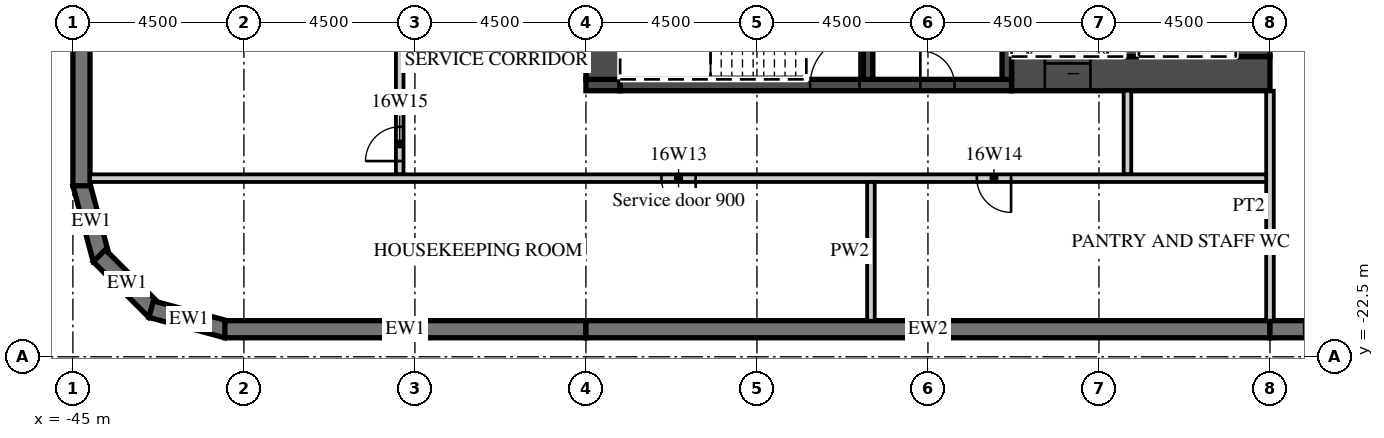
"""IFC4 building model, lengths in metres.
Left out: names, types, materials, properties, quantities, classifications, styles, units other than length and angle.
Written with IfcOpenShell. Run it as: python <this file> out.ifc"""

import sys

from ifc_helpers import new_model, si_unit, direction, frame, frame_2d, origin, place, context, subcontext, project, spatial, polyline, rectangle, outline, extrude, element, fill, save


model = new_model("IFC4")
c1 = context("Model", 3, precision=1e-05, world=origin(), true_north=direction((0.0, 1.0)))
c2 = subcontext(c1, "Body", "Model", "MODEL_VIEW")
j1 = project(units=[si_unit("LENGTHUNIT", "METRE"), si_unit("PLANEANGLEUNIT", "RADIAN")], contexts=[c1])
p1 = place(None, origin())
s1 = spatial("IfcSite", under=j1, at=p1, CompositionType="ELEMENT")
p2 = place(p1, origin())
s2 = spatial("IfcBuilding", under=s1, at=p2, CompositionType="ELEMENT")
p3 = place(p2, frame((0.0, 0.0, 83.1)))
s3 = spatial("IfcBuildingStorey", under=s2, at=p3, CompositionType="ELEMENT", Elevation=83.1)
p4 = place(p3, frame((-44.783, -17.942, 0.0), z_axis=(0.0, 0.0, 1.0), x_axis=(0.25881466832, -0.965926999034, 0.0)))
e1 = element("IfcWall", 1, at=p4, inside=s3, PredefinedType="SOLIDWALL", context=c2, shape_type="SweptSolid", body=[
    extrude(outline(polyline([(0.0, -0.225), (2.071, -0.225), (1.95, 0.225), (0.121, 0.225), (0.0, -0.225)])), origin(), (0.0, 0.0, 1.0), 3.02),
])
p5 = place(p3, frame((-44.305, -19.841, 0.0), z_axis=(0.0, 0.0, 1.0), x_axis=(0.707106781187, -0.707106781187, 0.0)))
e2 = element("IfcWall", 2, at=p5, inside=s3, PredefinedType="SOLIDWALL", context=c2, shape_type="SweptSolid", body=[
    extrude(outline(polyline([(0.0, -0.225), (2.071, -0.225), (1.95, 0.225), (0.121, 0.225), (0.0, -0.225)])), origin(), (0.0, 0.0, 1.0), 3.02),
])
p6 = place(p3, frame((-42.942, -21.247, 0.0), z_axis=(0.0, 0.0, 1.0), x_axis=(0.965926999034, -0.25881466832, 0.0)))
e3 = element("IfcWall", 3, at=p6, inside=s3, PredefinedType="SOLIDWALL", context=c2, shape_type="SweptSolid", body=[
    extrude(outline(polyline([(-0.0, -0.225), (2.07, -0.225), (1.95, 0.225), (0.12, 0.225), (-0.0, -0.225)])), origin(), (0.0, 0.0, 1.0), 3.02),
])
p7 = place(p3, frame((-41.0, -21.775, 0.0), z_axis=(0.0, 0.0, 1.0), x_axis=(1.0, 0.0, 0.0)))
e4 = element("IfcWall", 4, at=p7, inside=s3, PredefinedType="SOLIDWALL", context=c2, shape_type="SweptSolid", body=[
    extrude(rectangle(XDim=9.5, YDim=0.45, at=frame_2d((4.75, 0.0))), origin(), (0.0, 0.0, 1.0), 3.02),
])
p8 = place(p3, frame((-31.5, -21.775, 0.0), z_axis=(0.0, 0.0, 1.0), x_axis=(1.0, 0.0, 0.0)))
e5 = element("IfcWall", 5, at=p8, inside=s3, PredefinedType="SOLIDWALL", context=c2, shape_type="SweptSolid", body=[
    extrude(rectangle(XDim=18.0, YDim=0.45, at=frame_2d((9.0, 0.0))), origin(), (0.0, 0.0, 1.0), 3.02),
])
p9 = place(p3, frame((-13.5, -21.775, 0.0), z_axis=(0.0, 0.0, 1.0), x_axis=(1.0, 0.0, 0.0)))
e6 = element("IfcWall", 6, at=p9, inside=s3, PredefinedType="SOLIDWALL", context=c2, shape_type="SweptSolid", body=[
    extrude(rectangle(XDim=54.5, YDim=0.45, at=frame_2d((27.25, 0.0))), origin(), (0.0, 0.0, 1.0), 3.02),
])
p10 = place(p9, frame((0.9, 0.0, 0.45)))
e7 = element("IfcOpeningElement", 7, at=p10, cuts=e6, PredefinedType="OPENING", context=c2, shape_type="SweptSolid", body=[
    extrude(rectangle(XDim=2.7, YDim=2.25, at=frame_2d((1.35, 1.125))), frame((0.0, 0.235, 0.0), z_axis=(0.0, -1.0, 0.0), x_axis=(1.0, 0.0, 0.0)), (0.0, 0.0, 1.0), 0.47),
])
p11 = place(p9, frame((5.4, 0.0, 0.45)))
e8 = element("IfcOpeningElement", 8, at=p11, cuts=e6, PredefinedType="OPENING", context=c2, shape_type="SweptSolid", body=[
    extrude(rectangle(XDim=2.7, YDim=2.25, at=frame_2d((1.35, 1.125))), frame((0.0, 0.235, 0.0), z_axis=(0.0, -1.0, 0.0), x_axis=(1.0, 0.0, 0.0)), (0.0, 0.0, 1.0), 0.47),
])
p12 = place(p9, frame((9.9, 0.0, 0.45)))
e9 = element("IfcOpeningElement", 9, at=p12, cuts=e6, PredefinedType="OPENING", context=c2, shape_type="SweptSolid", body=[
    extrude(rectangle(XDim=2.7, YDim=2.25, at=frame_2d((1.35, 1.125))), frame((0.0, 0.235, 0.0), z_axis=(0.0, -1.0, 0.0), x_axis=(1.0, 0.0, 0.0)), (0.0, 0.0, 1.0), 0.47),
])
p13 = place(p9, frame((14.4, 0.0, 0.45)))
e10 = element("IfcOpeningElement", 10, at=p13, cuts=e6, PredefinedType="OPENING", context=c2, shape_type="SweptSolid", body=[
    extrude(rectangle(XDim=2.7, YDim=2.25, at=frame_2d((1.35, 1.125))), frame((0.0, 0.235, 0.0), z_axis=(0.0, -1.0, 0.0), x_axis=(1.0, 0.0, 0.0)), (0.0, 0.0, 1.0), 0.47),
])
p14 = place(p9, frame((18.9, 0.0, 0.45)))
e11 = element("IfcOpeningElement", 11, at=p14, cuts=e6, PredefinedType="OPENING", context=c2, shape_type="SweptSolid", body=[
    extrude(rectangle(XDim=2.7, YDim=2.25, at=frame_2d((1.35, 1.125))), frame((0.0, 0.235, 0.0), z_axis=(0.0, -1.0, 0.0), x_axis=(1.0, 0.0, 0.0)), (0.0, 0.0, 1.0), 0.47),
])
p15 = place(p9, frame((23.4, 0.0, 0.45)))
e12 = element("IfcOpeningElement", 12, at=p15, cuts=e6, PredefinedType="OPENING", context=c2, shape_type="SweptSolid", body=[
    extrude(rectangle(XDim=2.7, YDim=2.25, at=frame_2d((1.35, 1.125))), frame((0.0, 0.235, 0.0), z_axis=(0.0, -1.0, 0.0), x_axis=(1.0, 0.0, 0.0)), (0.0, 0.0, 1.0), 0.47),
])
p16 = place(p9, frame((27.9, 0.0, 0.45)))
e13 = element("IfcOpeningElement", 13, at=p16, cuts=e6, PredefinedType="OPENING", context=c2, shape_type="SweptSolid", body=[
    extrude(rectangle(XDim=2.7, YDim=2.25, at=frame_2d((1.35, 1.125))), frame((0.0, 0.235, 0.0), z_axis=(0.0, -1.0, 0.0), x_axis=(1.0, 0.0, 0.0)), (0.0, 0.0, 1.0), 0.47),
])
p17 = place(p9, frame((32.4, 0.0, 0.45)))
e14 = element("IfcOpeningElement", 14, at=p17, cuts=e6, PredefinedType="OPENING", context=c2, shape_type="SweptSolid", body=[
    extrude(rectangle(XDim=2.7, YDim=2.25, at=frame_2d((1.35, 1.125))), frame((0.0, 0.235, 0.0), z_axis=(0.0, -1.0, 0.0), x_axis=(1.0, 0.0, 0.0)), (0.0, 0.0, 1.0), 0.47),
])
p18 = place(p9, frame((36.9, 0.0, 0.45)))
e15 = element("IfcOpeningElement", 15, at=p18, cuts=e6, PredefinedType="OPENING", context=c2, shape_type="SweptSolid", body=[
    extrude(rectangle(XDim=2.7, YDim=2.25, at=frame_2d((1.35, 1.125))), frame((0.0, 0.235, 0.0), z_axis=(0.0, -1.0, 0.0), x_axis=(1.0, 0.0, 0.0)), (0.0, 0.0, 1.0), 0.47),
])
p19 = place(p9, frame((41.4, 0.0, 0.45)))
e16 = element("IfcOpeningElement", 16, at=p19, cuts=e6, PredefinedType="OPENING", context=c2, shape_type="SweptSolid", body=[
    extrude(rectangle(XDim=2.7, YDim=2.25, at=frame_2d((1.35, 1.125))), frame((0.0, 0.235, 0.0), z_axis=(0.0, -1.0, 0.0), x_axis=(1.0, 0.0, 0.0)), (0.0, 0.0, 1.0), 0.47),
])
p20 = place(p9, frame((45.9, 0.0, 0.45)))
e17 = element("IfcOpeningElement", 17, at=p20, cuts=e6, PredefinedType="OPENING", context=c2, shape_type="SweptSolid", body=[
    extrude(rectangle(XDim=2.7, YDim=2.25, at=frame_2d((1.35, 1.125))), frame((0.0, 0.235, 0.0), z_axis=(0.0, -1.0, 0.0), x_axis=(1.0, 0.0, 0.0)), (0.0, 0.0, 1.0), 0.47),
])
p21 = place(p9, frame((50.4, 0.0, 0.45)))
e18 = element("IfcOpeningElement", 18, at=p21, cuts=e6, PredefinedType="OPENING", context=c2, shape_type="SweptSolid", body=[
    extrude(rectangle(XDim=2.7, YDim=2.25, at=frame_2d((1.35, 1.125))), frame((0.0, 0.235, 0.0), z_axis=(0.0, -1.0, 0.0), x_axis=(1.0, 0.0, 0.0)), (0.0, 0.0, 1.0), 0.47),
])
p22 = place(p3, frame((-44.775, 18.0, 0.0), z_axis=(0.0, 0.0, 1.0), x_axis=(0.0, -1.0, 0.0)))
e19 = element("IfcWall", 19, at=p22, inside=s3, PredefinedType="SOLIDWALL", context=c2, shape_type="SweptSolid", body=[
    extrude(rectangle(XDim=36.0, YDim=0.45, at=frame_2d((18.0, 0.0))), origin(), (0.0, 0.0, 1.0), 3.02),
])
p23 = place(p22, frame((3.9, 0.0, 0.45)))
e20 = element("IfcOpeningElement", 20, at=p23, cuts=e19, PredefinedType="OPENING", context=c2, shape_type="SweptSolid", body=[
    extrude(rectangle(XDim=3.3, YDim=2.25, at=frame_2d((1.65, 1.125))), frame((0.0, 0.235, 0.0), z_axis=(0.0, -1.0, 0.0), x_axis=(1.0, 0.0, 0.0)), (0.0, 0.0, 1.0), 0.47),
])
p24 = place(p22, frame((8.4, 0.0, 0.45)))
e21 = element("IfcOpeningElement", 21, at=p24, cuts=e19, PredefinedType="OPENING", context=c2, shape_type="SweptSolid", body=[
    extrude(rectangle(XDim=3.3, YDim=2.25, at=frame_2d((1.65, 1.125))), frame((0.0, 0.235, 0.0), z_axis=(0.0, -1.0, 0.0), x_axis=(1.0, 0.0, 0.0)), (0.0, 0.0, 1.0), 0.47),
])
p25 = place(p22, frame((12.9, 0.0, 0.45)))
e22 = element("IfcOpeningElement", 22, at=p25, cuts=e19, PredefinedType="OPENING", context=c2, shape_type="SweptSolid", body=[
    extrude(rectangle(XDim=3.3, YDim=2.25, at=frame_2d((1.65, 1.125))), frame((0.0, 0.235, 0.0), z_axis=(0.0, -1.0, 0.0), x_axis=(1.0, 0.0, 0.0)), (0.0, 0.0, 1.0), 0.47),
])
p26 = place(p3, frame((-13.5, -21.55, 0.0), z_axis=(0.0, 0.0, 1.0), x_axis=(0.0, 1.0, 0.0)))
e23 = element("IfcWall", 23, at=p26, inside=s3, PredefinedType="PARTITIONING", context=c2, shape_type="SweptSolid", body=[
    extrude(rectangle(XDim=6.05, YDim=0.2, at=frame_2d((3.025, 0.0))), origin(), (0.0, 0.0, 1.0), 3.02),
])
p27 = place(p3, frame((-20.3, -15.05, 0.0), z_axis=(0.0, 0.0, 1.0), x_axis=(1.0, 0.0, 0.0)))
e24 = element("IfcWall", 24, at=p27, inside=s3, PredefinedType="SHEAR", context=c2, shape_type="SweptSolid", body=[
    extrude(rectangle(XDim=6.8, YDim=0.9, at=frame_2d((3.4, 0.0))), origin(), (0.0, 0.0, 1.0), 3.02),
])
p28 = place(p27, frame((0.875, 0.0, 0.0)))
e25 = element("IfcOpeningElement", 25, at=p28, cuts=e24, PredefinedType="OPENING", context=c2, shape_type="SweptSolid", body=[
    extrude(rectangle(XDim=1.2, YDim=2.1, at=frame_2d((0.6, 1.05))), frame((0.0, 0.46, 0.0), z_axis=(0.0, -1.0, 0.0), x_axis=(1.0, 0.0, 0.0)), (0.0, 0.0, 1.0), 0.92),
])
p29 = place(p3, frame((-31.5, -15.35, 0.0), z_axis=(0.0, 0.0, 1.0), x_axis=(1.0, 0.0, 0.0)))
e26 = element("IfcWall", 26, at=p29, inside=s3, PredefinedType="SHEAR", context=c2, shape_type="SweptSolid", body=[
    extrude(rectangle(XDim=0.9, YDim=0.3, at=frame_2d((0.45, 0.0))), origin(), (0.0, 0.0, 1.0), 3.02),
])
p30 = place(p3, frame((-30.6, -15.35, 0.0), z_axis=(0.0, 0.0, 1.0), x_axis=(1.0, 0.0, 0.0)))
e27 = element("IfcWall", 27, at=p30, inside=s3, PredefinedType="SHEAR", context=c2, shape_type="SweptSolid", body=[
    extrude(rectangle(XDim=10.3, YDim=0.3, at=frame_2d((5.15, 0.0))), origin(), (0.0, 0.0, 1.0), 3.02),
])
p31 = place(p30, frame((5.0, 0.0, 0.0)))
e28 = element("IfcOpeningElement", 28, at=p31, cuts=e27, PredefinedType="OPENING", context=c2, shape_type="SweptSolid", body=[
    extrude(rectangle(XDim=1.3, YDim=2.1, at=frame_2d((0.65, 1.05))), frame((0.0, 0.16, 0.0), z_axis=(0.0, -1.0, 0.0), x_axis=(1.0, 0.0, 0.0)), (0.0, 0.0, 1.0), 0.32),
])
p32 = place(p30, frame((7.9, 0.0, 0.0)))
e29 = element("IfcOpeningElement", 29, at=p32, cuts=e27, PredefinedType="OPENING", context=c2, shape_type="SweptSolid", body=[
    extrude(rectangle(XDim=0.9, YDim=2.1, at=frame_2d((0.45, 1.05))), frame((0.0, 0.16, 0.0), z_axis=(0.0, -1.0, 0.0), x_axis=(1.0, 0.0, 0.0)), (0.0, 0.0, 1.0), 0.32),
])
p33 = place(p3, frame((-31.05, -15.2, 0.0), z_axis=(0.0, 0.0, 1.0), x_axis=(0.0, 1.0, 0.0)))
e30 = element("IfcWall", 30, at=p33, inside=s3, PredefinedType="SHEAR", context=c2, shape_type="SweptSolid", body=[
    extrude(rectangle(XDim=12.8, YDim=0.9, at=frame_2d((6.4, 0.0))), origin(), (0.0, 0.0, 1.0), 3.02),
])
p34 = place(p33, frame((11.5, 0.0, 0.0)))
e31 = element("IfcOpeningElement", 31, at=p34, cuts=e30, PredefinedType="OPENING", context=c2, shape_type="SweptSolid", body=[
    extrude(rectangle(XDim=1.1, YDim=2.1, at=frame_2d((0.55, 1.05))), frame((0.0, 0.46, 0.0), z_axis=(0.0, -1.0, 0.0), x_axis=(1.0, 0.0, 0.0)), (0.0, 0.0, 1.0), 0.92),
])
p35 = place(p3, frame((-13.95, -14.6, 0.0), z_axis=(0.0, 0.0, 1.0), x_axis=(0.0, 1.0, 0.0)))
e32 = element("IfcWall", 32, at=p35, inside=s3, PredefinedType="SHEAR", context=c2, shape_type="SweptSolid", body=[
    extrude(rectangle(XDim=12.2, YDim=0.9, at=frame_2d((6.1, 0.0))), origin(), (0.0, 0.0, 1.0), 3.02),
])
p36 = place(p3, frame((-17.15, -14.6, 0.0), z_axis=(0.0, 0.0, 1.0), x_axis=(0.0, 1.0, 0.0)))
e33 = element("IfcWall", 33, at=p36, inside=s3, PredefinedType="SHEAR", context=c2, shape_type="SweptSolid", body=[
    extrude(rectangle(XDim=5.8, YDim=0.4, at=frame_2d((2.9, 0.0))), origin(), (0.0, 0.0, 1.0), 3.02),
])
for number, where, z_axis, x_axis in (
    (34, (-20.425, -15.2, 0.0), (0.0, 0.0, 1.0), (0.0, 1.0, 0.0)),
    (35, (-24.075, -15.2, 0.0), (0.0, 0.0, 1.0), (0.0, 1.0, 0.0)),
):
    element("IfcWall", number, at=place(p3, frame(where, z_axis=z_axis, x_axis=x_axis)), inside=s3, PredefinedType="SHEAR", context=c2, shape_type="SweptSolid", body=[
        extrude(rectangle(XDim=3.25, YDim=0.25, at=frame_2d((1.625, 0.0))), origin(), (0.0, 0.0, 1.0), 3.02),
    ])
p37 = place(p3, frame((-17.25, -17.7, 0.0), z_axis=(0.0, 0.0, 1.0), x_axis=(0.0, 1.0, 0.0)))
e36 = element("IfcWall", 36, at=p37, inside=s3, PredefinedType="PARTITIONING", context=c2, shape_type="SweptSolid", body=[
    extrude(rectangle(XDim=2.2, YDim=0.2, at=frame_2d((1.1, 0.0))), origin(), (0.0, 0.0, 1.0), 3.02),
])
p38 = place(p3, frame((-36.4, -17.7, 0.0), z_axis=(0.0, 0.0, 1.0), x_axis=(0.0, 1.0, 0.0)))
e37 = element("IfcWall", 37, at=p38, inside=s3, PredefinedType="PARTITIONING", context=c2, shape_type="SweptSolid", body=[
    extrude(rectangle(XDim=15.95, YDim=0.2, at=frame_2d((7.975, 0.0))), origin(), (0.0, 0.0, 1.0), 3.02),
])
p39 = place(p38, frame((0.35, 0.0, 0.0)))
e38 = element("IfcOpeningElement", 38, at=p39, cuts=e37, PredefinedType="OPENING", context=c2, shape_type="SweptSolid", body=[
    extrude(rectangle(XDim=0.9, YDim=2.1, at=frame_2d((0.45, 1.05))), frame((0.0, 0.11, 0.0), z_axis=(0.0, -1.0, 0.0), x_axis=(1.0, 0.0, 0.0)), (0.0, 0.0, 1.0), 0.22),
])
p40 = place(p3, frame((-44.55, -17.8, 0.0), z_axis=(0.0, 0.0, 1.0), x_axis=(1.0, 0.0, 0.0)))
e39 = element("IfcWall", 39, at=p40, inside=s3, PredefinedType="PARTITIONING", context=c2, shape_type="SweptSolid", body=[
    extrude(rectangle(XDim=30.95, YDim=0.2, at=frame_2d((15.475, 0.0))), origin(), (0.0, 0.0, 1.0), 3.02),
])
p41 = place(p40, frame((15.038, 0.0, 0.0)))
e40 = element("IfcOpeningElement", 40, at=p41, cuts=e39, PredefinedType="OPENING", context=c2, shape_type="SweptSolid", body=[
    extrude(rectangle(XDim=0.9, YDim=2.1, at=frame_2d((0.45, 1.05))), frame((0.0, 0.11, 0.0), z_axis=(0.0, -1.0, 0.0), x_axis=(1.0, 0.0, 0.0)), (0.0, 0.0, 1.0), 0.22),
])
p42 = place(p40, frame((23.337, 0.0, 0.0)))
e41 = element("IfcOpeningElement", 41, at=p42, cuts=e39, PredefinedType="OPENING", context=c2, shape_type="SweptSolid", body=[
    extrude(rectangle(XDim=0.9, YDim=2.1, at=frame_2d((0.45, 1.05))), frame((0.0, 0.11, 0.0), z_axis=(0.0, -1.0, 0.0), x_axis=(1.0, 0.0, 0.0)), (0.0, 0.0, 1.0), 0.22),
])
p43 = place(p3, frame((-24.0, -21.55, 0.0), z_axis=(0.0, 0.0, 1.0), x_axis=(0.0, 1.0, 0.0)))
e42 = element("IfcWall", 42, at=p43, inside=s3, PredefinedType="PARTITIONING", context=c2, shape_type="SweptSolid", body=[
    extrude(rectangle(XDim=3.65, YDim=0.2, at=frame_2d((1.825, 0.0))), origin(), (0.0, 0.0, 1.0), 3.02),
])
p44 = place(p28, origin())
e43 = element("IfcDoor", 43, at=p44, inside=s3, OperationType="SLIDING_TO_LEFT", PredefinedType="DOOR", context=c2, shape_type="SweptSolid", body=[
    extrude(rectangle(XDim=1.2, YDim=2.1, at=frame_2d((0.6, 1.05))), frame((0.0, 0.025, 0.0), z_axis=(0.0, -1.0, 0.0), x_axis=(1.0, 0.0, 0.0)), (0.0, 0.0, 1.0), 0.05),
])
fill(e25, e43)
p45 = place(p31, origin())
e44 = element("IfcDoor", 44, at=p45, inside=s3, OperationType="SINGLE_SWING_RIGHT", PredefinedType="DOOR", context=c2, shape_type="SweptSolid", body=[
    extrude(rectangle(XDim=1.3, YDim=2.1, at=frame_2d((0.65, 1.05))), frame((0.0, 0.025, 0.0), z_axis=(0.0, -1.0, 0.0), x_axis=(1.0, 0.0, 0.0)), (0.0, 0.0, 1.0), 0.05),
])
fill(e28, e44)
p46 = place(p32, origin())
e45 = element("IfcDoor", 45, at=p46, inside=s3, OperationType="SINGLE_SWING_LEFT", PredefinedType="DOOR", context=c2, shape_type="SweptSolid", body=[
    extrude(rectangle(XDim=0.9, YDim=2.1, at=frame_2d((0.45, 1.05))), frame((0.0, 0.025, 0.0), z_axis=(0.0, -1.0, 0.0), x_axis=(1.0, 0.0, 0.0)), (0.0, 0.0, 1.0), 0.05),
])
fill(e29, e45)
p47 = place(p41, origin())
e46 = element("IfcDoor", 46, at=p47, inside=s3, OperationType="SINGLE_SWING_RIGHT", PredefinedType="DOOR", context=c2, shape_type="SweptSolid", body=[
    extrude(rectangle(XDim=0.9, YDim=2.1, at=frame_2d((0.45, 1.05))), frame((0.0, 0.025, 0.0), z_axis=(0.0, -1.0, 0.0), x_axis=(1.0, 0.0, 0.0)), (0.0, 0.0, 1.0), 0.05),
])
fill(e40, e46)
p48 = place(p42, origin())
e47 = element("IfcDoor", 47, at=p48, inside=s3, OperationType="SINGLE_SWING_RIGHT", PredefinedType="DOOR", context=c2, shape_type="SweptSolid", body=[
    extrude(rectangle(XDim=0.9, YDim=2.1, at=frame_2d((0.45, 1.05))), frame((0.0, 0.025, 0.0), z_axis=(0.0, -1.0, 0.0), x_axis=(1.0, 0.0, 0.0)), (0.0, 0.0, 1.0), 0.05),
])
fill(e41, e47)
p49 = place(p39, origin())
e48 = element("IfcDoor", 48, at=p49, inside=s3, OperationType="SINGLE_SWING_LEFT", PredefinedType="DOOR", context=c2, shape_type="SweptSolid", body=[
    extrude(rectangle(XDim=0.9, YDim=2.1, at=frame_2d((0.45, 1.05))), frame((0.0, 0.025, 0.0), z_axis=(0.0, -1.0, 0.0), x_axis=(1.0, 0.0, 0.0)), (0.0, 0.0, 1.0), 0.05),
])
fill(e38, e48)
save(model, sys.argv[1])
